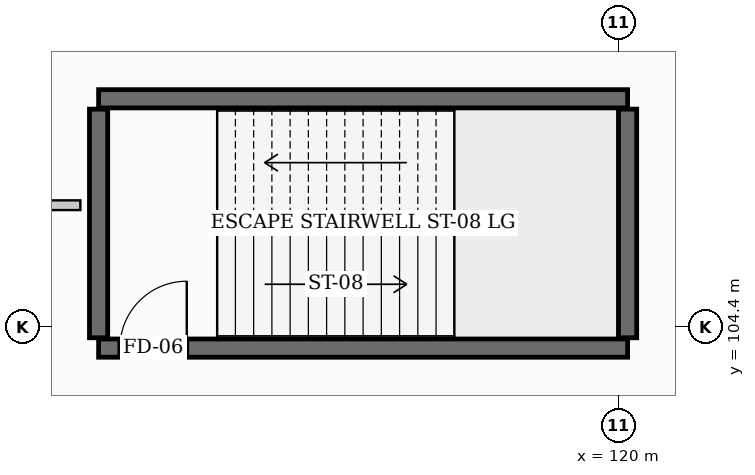
"""IFC4 building model, lengths in metres.
Left out: names, types, materials, properties, quantities, classifications, styles, units other than length and angle.
Written with IfcOpenShell. Run it as: python <this file> out.ifc"""

import sys

from ifc_helpers import new_model, si_unit, direction, frame, frame_2d, origin, place, context, subcontext, project, spatial, rectangle, extrude, element, fill, save


model = new_model("IFC4")
c1 = context("Model", 3, precision=1e-05, world=origin(), true_north=direction((0.0, 1.0)))
c2 = subcontext(c1, "Body", "Model", "MODEL_VIEW")
j1 = project(units=[si_unit("LENGTHUNIT", "METRE"), si_unit("PLANEANGLEUNIT", "RADIAN")], contexts=[c1])
p1 = place(None, origin())
s1 = spatial("IfcSite", under=j1, at=p1, CompositionType="ELEMENT")
p2 = place(p1, origin())
s2 = spatial("IfcBuilding", under=s1, at=p2, CompositionType="ELEMENT")
p3 = place(p2, frame((0.0, 0.0, -4.8)))
s3 = spatial("IfcBuildingStorey", under=s2, at=p3, CompositionType="ELEMENT", Elevation=-4.8)
p4 = place(p3, frame((111.45, 104.05, 0.0), z_axis=(0.0, 0.0, 1.0), x_axis=(1.0, 0.0, 0.0)))
e1 = element("IfcWall", 1, at=p4, inside=s3, PredefinedType="SHEAR", context=c2, shape_type="SweptSolid", body=[
    extrude(rectangle(XDim=8.7, YDim=0.3, at=frame_2d((4.35, 0.0))), origin(), (0.0, 0.0, 1.0), 4.8),
])
p5 = place(p4, frame((0.35, 0.0, 0.0)))
e2 = element("IfcOpeningElement", 2, at=p5, cuts=e1, PredefinedType="OPENING", context=c2, shape_type="SweptSolid", body=[
    extrude(rectangle(XDim=1.1, YDim=2.15, at=frame_2d((0.55, 1.075))), frame((0.0, 0.16, 0.0), z_axis=(0.0, -1.0, 0.0), x_axis=(1.0, 0.0, 0.0)), (0.0, 0.0, 1.0), 0.32),
])
p6 = place(p3, frame((120.15, 108.15, 0.0), z_axis=(0.0, 0.0, 1.0), x_axis=(-1.0, 0.0, 0.0)))
e3 = element("IfcWall", 3, at=p6, inside=s3, PredefinedType="SHEAR", context=c2, shape_type="SweptSolid", body=[
    extrude(rectangle(XDim=8.7, YDim=0.3, at=frame_2d((4.35, 0.0))), origin(), (0.0, 0.0, 1.0), 4.8),
])
for number, where, z_axis, x_axis in (
    (4, (111.45, 104.22, 0.0), (0.0, 0.0, 1.0), (0.0, 1.0, 0.0)),
    (5, (120.15, 104.22, 0.0), (0.0, 0.0, 1.0), (0.0, 1.0, 0.0)),
):
    element("IfcWall", number, at=place(p3, frame(where, z_axis=z_axis, x_axis=x_axis)), inside=s3, PredefinedType="SHEAR", context=c2, shape_type="SweptSolid", body=[
        extrude(rectangle(XDim=3.76, YDim=0.3, at=frame_2d((1.88, 0.0))), origin(), (0.0, 0.0, 1.0), 4.8),
    ])
p7 = place(p3, frame((104.8, 106.4, 0.0), z_axis=(0.0, 0.0, 1.0), x_axis=(1.0, 0.0, 0.0)))
e6 = element("IfcWall", 6, at=p7, inside=s3, PredefinedType="PARTITIONING", context=c2, shape_type="SweptSolid", body=[
    extrude(rectangle(XDim=6.35, YDim=0.16, at=frame_2d((3.175, 0.0))), origin(), (0.0, 0.0, 1.0), 4.43),
])
p8 = place(p7, frame((0.32, 0.0, 0.0)))
e7 = element("IfcOpeningElement", 7, at=p8, cuts=e6, PredefinedType="OPENING", context=c2, shape_type="SweptSolid", body=[
    extrude(rectangle(XDim=1.52, YDim=2.16, at=frame_2d((0.76, 1.08))), frame((0.0, 0.09, 0.0), z_axis=(0.0, -1.0, 0.0), x_axis=(1.0, 0.0, 0.0)), (0.0, 0.0, 1.0), 0.18),
])
p9 = place(p5, origin())
e8 = element("IfcDoor", 8, at=p9, inside=s3, OperationType="SINGLE_SWING_RIGHT", PredefinedType="DOOR", context=c2, shape_type="SweptSolid", body=[
    extrude(rectangle(XDim=1.1, YDim=2.15, at=frame_2d((0.55, 1.075))), frame((0.0, 0.025, 0.0), z_axis=(0.0, -1.0, 0.0), x_axis=(1.0, 0.0, 0.0)), (0.0, 0.0, 1.0), 0.05),
])
fill(e2, e8)
save(model, sys.argv[1])
